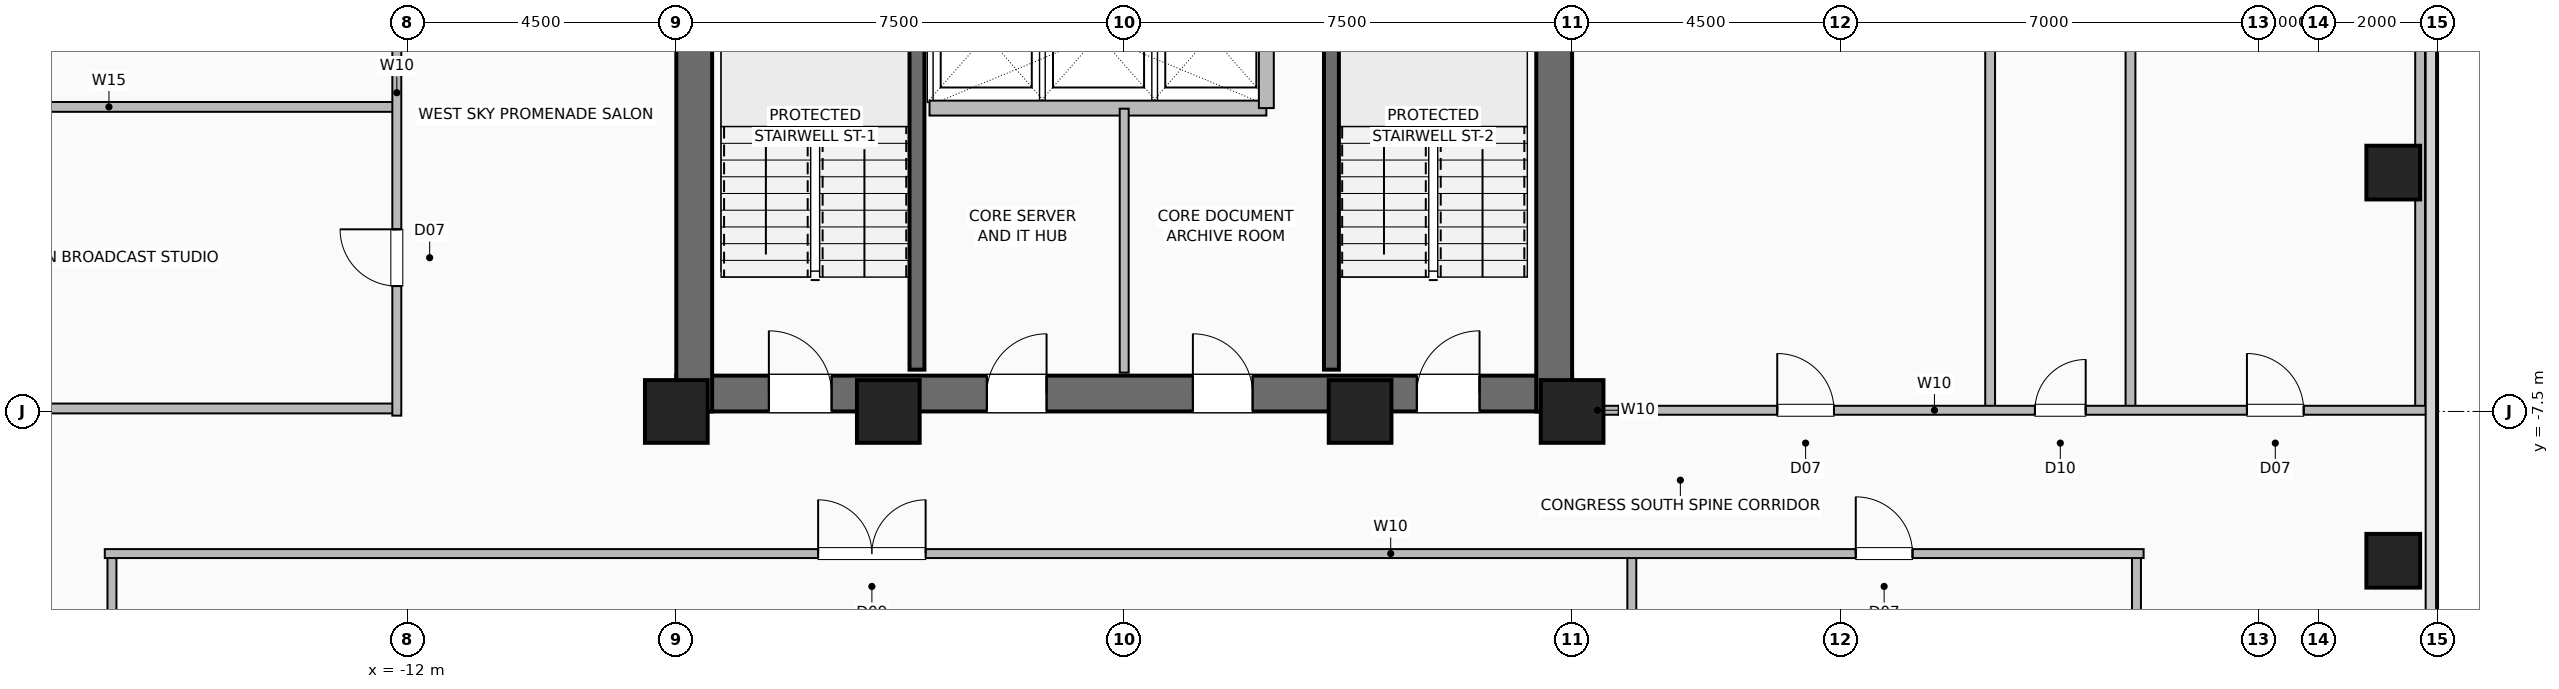
"""IFC4 building model, lengths in metres.
Left out: names, types, materials, properties, quantities, classifications, styles, units other than length and angle.
Written with IfcOpenShell. Run it as: python <this file> out.ifc"""

import sys

from ifc_helpers import new_model, si_unit, direction, frame, frame_2d, origin, origin_2d, place, context, subcontext, project, spatial, rectangle, hollow_rectangle, extrude, element, fill, save


model = new_model("IFC4")
c1 = context("Model", 3, precision=1e-05, world=origin(), true_north=direction((0.0, 1.0)))
c2 = subcontext(c1, "Body", "Model", "MODEL_VIEW")
j1 = project(units=[si_unit("LENGTHUNIT", "METRE"), si_unit("PLANEANGLEUNIT", "RADIAN")], contexts=[c1])
p1 = place(None, origin())
s1 = spatial("IfcSite", under=j1, at=p1, CompositionType="ELEMENT")
p2 = place(p1, origin())
s2 = spatial("IfcBuilding", under=s1, at=p2, CompositionType="ELEMENT")
p3 = place(p2, frame((0.0, 0.0, 140.8)))
s3 = spatial("IfcBuildingStorey", under=s2, at=p3, CompositionType="ELEMENT", Elevation=140.8)
for number, where, z_axis, x_axis in (
    (1, (-7.5, -7.5, 0.0), (0.0, 0.0, 1.0), (1.0, 0.0, 0.0)),
    (2, (-3.95, -7.5, 0.0), (0.0, 0.0, 1.0), (1.0, 0.0, 0.0)),
    (3, (3.95, -7.5, 0.0), (0.0, 0.0, 1.0), (1.0, 0.0, 0.0)),
    (4, (7.5, -7.5, 0.0), (0.0, 0.0, 1.0), (1.0, 0.0, 0.0)),
):
    element("IfcColumn", number, at=place(p3, frame(where, z_axis=z_axis, x_axis=x_axis)), inside=s3, PredefinedType="COLUMN", context=c2, shape_type="SweptSolid", body=[
        extrude(hollow_rectangle(XDim=1.05, YDim=1.05, WallThickness=0.05, at=origin_2d()), origin(), (0.0, 0.0, 1.0), 3.6),
    ])
for number, where, z_axis, x_axis in (
    (5, (21.25, -10.0, 0.0), (0.0, 0.0, 1.0), (1.0, 0.0, 0.0)),
    (6, (21.25, -3.5, 0.0), (0.0, 0.0, 1.0), (1.0, 0.0, 0.0)),
):
    element("IfcColumn", number, at=place(p3, frame(where, z_axis=z_axis, x_axis=x_axis)), inside=s3, PredefinedType="COLUMN", context=c2, shape_type="SweptSolid", body=[
        extrude(hollow_rectangle(XDim=0.9, YDim=0.9, WallThickness=0.045, at=origin_2d()), origin(), (0.0, 0.0, 1.0), 3.6),
    ])
p4 = place(p3, frame((-7.5, -7.2, 0.0), z_axis=(0.0, 0.0, 1.0), x_axis=(1.0, 0.0, 0.0)))
e7 = element("IfcWall", 7, at=p4, inside=s3, PredefinedType="SHEAR", context=c2, shape_type="SweptSolid", body=[
    extrude(rectangle(XDim=15.0, YDim=0.6, at=frame_2d((7.5, 0.0))), origin(), (0.0, 0.0, 1.0), 3.36),
])
p5 = place(p4, frame((1.55, 0.0, 0.0)))
e8 = element("IfcOpeningElement", 8, at=p5, cuts=e7, PredefinedType="OPENING", context=c2, shape_type="SweptSolid", body=[
    extrude(rectangle(XDim=1.05, YDim=2.08, at=frame_2d((0.525, 1.04))), frame((0.0, 0.31, 0.0), z_axis=(0.0, -1.0, 0.0), x_axis=(1.0, 0.0, 0.0)), (0.0, 0.0, 1.0), 0.62),
])
p6 = place(p4, frame((12.4, 0.0, 0.0)))
e9 = element("IfcOpeningElement", 9, at=p6, cuts=e7, PredefinedType="OPENING", context=c2, shape_type="SweptSolid", body=[
    extrude(rectangle(XDim=1.05, YDim=2.08, at=frame_2d((0.525, 1.04))), frame((0.0, 0.31, 0.0), z_axis=(0.0, -1.0, 0.0), x_axis=(1.0, 0.0, 0.0)), (0.0, 0.0, 1.0), 0.62),
])
p7 = place(p4, frame((5.2, 0.0, 0.0)))
e10 = element("IfcOpeningElement", 10, at=p7, cuts=e7, PredefinedType="OPENING", context=c2, shape_type="SweptSolid", body=[
    extrude(rectangle(XDim=1.0, YDim=2.08, at=frame_2d((0.5, 1.04))), frame((0.0, 0.31, 0.0), z_axis=(0.0, -1.0, 0.0), x_axis=(1.0, 0.0, 0.0)), (0.0, 0.0, 1.0), 0.62),
])
p8 = place(p4, frame((8.65, 0.0, 0.0)))
e11 = element("IfcOpeningElement", 11, at=p8, cuts=e7, PredefinedType="OPENING", context=c2, shape_type="SweptSolid", body=[
    extrude(rectangle(XDim=1.0, YDim=2.08, at=frame_2d((0.5, 1.04))), frame((0.0, 0.31, 0.0), z_axis=(0.0, -1.0, 0.0), x_axis=(1.0, 0.0, 0.0)), (0.0, 0.0, 1.0), 0.62),
])
p9 = place(p3, frame((-7.2, -7.5, 0.0), z_axis=(0.0, 0.0, 1.0), x_axis=(0.0, 1.0, 0.0)))
e12 = element("IfcWall", 12, at=p9, inside=s3, PredefinedType="SHEAR", context=c2, shape_type="SweptSolid", body=[
    extrude(rectangle(XDim=15.0, YDim=0.6, at=frame_2d((7.5, 0.0))), origin(), (0.0, 0.0, 1.0), 3.36),
])
p10 = place(p9, frame((9.5, 0.0, 0.0)))
e13 = element("IfcOpeningElement", 13, at=p10, cuts=e12, PredefinedType="OPENING", context=c2, shape_type="SweptSolid", body=[
    extrude(rectangle(XDim=1.0, YDim=2.08, at=frame_2d((0.5, 1.04))), frame((0.0, 0.31, 0.0), z_axis=(0.0, -1.0, 0.0), x_axis=(1.0, 0.0, 0.0)), (0.0, 0.0, 1.0), 0.62),
])
p11 = place(p3, frame((7.2, -7.5, 0.0), z_axis=(0.0, 0.0, 1.0), x_axis=(0.0, 1.0, 0.0)))
e14 = element("IfcWall", 14, at=p11, inside=s3, PredefinedType="SHEAR", context=c2, shape_type="SweptSolid", body=[
    extrude(rectangle(XDim=15.0, YDim=0.6, at=frame_2d((7.5, 0.0))), origin(), (0.0, 0.0, 1.0), 3.36),
])
for number, where, z_axis, x_axis in (
    (15, (-3.47, -6.8, 0.0), (0.0, 0.0, 1.0), (0.0, 1.0, 0.0)),
    (16, (3.47, -6.8, 0.0), (0.0, 0.0, 1.0), (0.0, 1.0, 0.0)),
):
    element("IfcWall", number, at=place(p3, frame(where, z_axis=z_axis, x_axis=x_axis)), inside=s3, PredefinedType="SHEAR", context=c2, shape_type="SweptSolid", body=[
        extrude(rectangle(XDim=7.72, YDim=0.25, at=frame_2d((3.86, 0.0))), origin(), (0.0, 0.0, 1.0), 3.36),
    ])
p12 = place(p3, frame((-3.26, -2.42, 0.0), z_axis=(0.0, 0.0, 1.0), x_axis=(1.0, 0.0, 0.0)))
e17 = element("IfcWall", 17, at=p12, inside=s3, PredefinedType="SHEAR", context=c2, shape_type="SweptSolid", body=[
    extrude(rectangle(XDim=5.64, YDim=0.25, at=frame_2d((2.82, 0.0))), origin(), (0.0, 0.0, 1.0), 3.36),
])
p13 = place(p3, frame((2.38, -2.42, 0.0), z_axis=(0.0, 0.0, 1.0), x_axis=(0.0, 1.0, 0.0)))
e18 = element("IfcWall", 18, at=p13, inside=s3, PredefinedType="SHEAR", context=c2, shape_type="SweptSolid", body=[
    extrude(rectangle(XDim=2.44, YDim=0.25, at=frame_2d((1.22, 0.0))), origin(), (0.0, 0.0, 1.0), 3.36),
])
p14 = place(p3, frame((0.0, -6.85, 0.0), z_axis=(0.0, 0.0, 1.0), x_axis=(0.0, 1.0, 0.0)))
e19 = element("IfcWall", 19, at=p14, inside=s3, PredefinedType="PARTITIONING", context=c2, shape_type="SweptSolid", body=[
    extrude(rectangle(XDim=4.42, YDim=0.15, at=frame_2d((2.21, 0.0))), origin(), (0.0, 0.0, 1.0), 3.36),
])
for number, where, z_axis, x_axis in (
    (20, (-16.95, -21.82, 0.0), (0.0, 0.0, 1.0), (0.0, 1.0, 0.0)),
    (21, (8.5, -21.82, 0.0), (0.0, 0.0, 1.0), (0.0, 1.0, 0.0)),
    (22, (16.95, -21.82, 0.0), (0.0, 0.0, 1.0), (0.0, 1.0, 0.0)),
):
    element("IfcWall", number, at=place(p3, frame(where, z_axis=z_axis, x_axis=x_axis)), inside=s3, PredefinedType="PARTITIONING", context=c2, shape_type="SweptSolid", body=[
        extrude(rectangle(XDim=11.94, YDim=0.15, at=frame_2d((5.97, 0.0))), origin(), (0.0, 0.0, 1.0), 3.36),
    ])
p15 = place(p3, frame((-17.07, -9.88, 0.0), z_axis=(0.0, 0.0, 1.0), x_axis=(1.0, 0.0, 0.0)))
e23 = element("IfcWall", 23, at=p15, inside=s3, PredefinedType="PARTITIONING", context=c2, shape_type="SweptSolid", body=[
    extrude(rectangle(XDim=34.14, YDim=0.15, at=frame_2d((17.07, 0.0))), origin(), (0.0, 0.0, 1.0), 3.36),
])
p16 = place(p15, frame((11.945, 0.0, 0.0)))
e24 = element("IfcOpeningElement", 24, at=p16, cuts=e23, PredefinedType="OPENING", context=c2, shape_type="SweptSolid", body=[
    extrude(rectangle(XDim=1.8, YDim=2.08, at=frame_2d((0.9, 1.04))), frame((0.0, 0.085, 0.0), z_axis=(0.0, -1.0, 0.0), x_axis=(1.0, 0.0, 0.0)), (0.0, 0.0, 1.0), 0.17),
])
p17 = place(p15, frame((29.32, 0.0, 0.0)))
e25 = element("IfcOpeningElement", 25, at=p17, cuts=e23, PredefinedType="OPENING", context=c2, shape_type="SweptSolid", body=[
    extrude(rectangle(XDim=0.95, YDim=2.06, at=frame_2d((0.475, 1.03))), frame((0.0, 0.085, 0.0), z_axis=(0.0, -1.0, 0.0), x_axis=(1.0, 0.0, 0.0)), (0.0, 0.0, 1.0), 0.17),
])
for number, where, z_axis, x_axis in (
    (26, (-21.82, -7.45, 0.0), (0.0, 0.0, 1.0), (1.0, 0.0, 0.0)),
    (27, (-21.82, -2.4, 0.0), (0.0, 0.0, 1.0), (1.0, 0.0, 0.0)),
):
    element("IfcWall", number, at=place(p3, frame(where, z_axis=z_axis, x_axis=x_axis)), inside=s3, PredefinedType="PLUMBINGWALL", context=c2, shape_type="SweptSolid", body=[
        extrude(rectangle(XDim=9.64, YDim=0.165, at=frame_2d((4.82, 0.0))), origin(), (0.0, 0.0, 1.0), 3.36),
    ])
p18 = place(p3, frame((-12.18, -7.57, 0.0), z_axis=(0.0, 0.0, 1.0), x_axis=(0.0, 1.0, 0.0)))
e28 = element("IfcWall", 28, at=p18, inside=s3, PredefinedType="PARTITIONING", context=c2, shape_type="SweptSolid", body=[
    extrude(rectangle(XDim=15.14, YDim=0.15, at=frame_2d((7.57, 0.0))), origin(), (0.0, 0.0, 1.0), 3.36),
])
p19 = place(p18, frame((2.17, 0.0, 0.0)))
e29 = element("IfcOpeningElement", 29, at=p19, cuts=e28, PredefinedType="OPENING", context=c2, shape_type="SweptSolid", body=[
    extrude(rectangle(XDim=0.95, YDim=2.06, at=frame_2d((0.475, 1.03))), frame((0.0, 0.085, 0.0), z_axis=(0.0, -1.0, 0.0), x_axis=(1.0, 0.0, 0.0)), (0.0, 0.0, 1.0), 0.17),
])
p20 = place(p18, frame((7.695, 0.0, 0.0)))
e30 = element("IfcOpeningElement", 30, at=p20, cuts=e28, PredefinedType="OPENING", context=c2, shape_type="SweptSolid", body=[
    extrude(rectangle(XDim=0.95, YDim=2.06, at=frame_2d((0.475, 1.03))), frame((0.0, 0.085, 0.0), z_axis=(0.0, -1.0, 0.0), x_axis=(1.0, 0.0, 0.0)), (0.0, 0.0, 1.0), 0.17),
])
p21 = place(p18, frame((11.615, 0.0, 0.0)))
e31 = element("IfcOpeningElement", 31, at=p21, cuts=e28, PredefinedType="OPENING", context=c2, shape_type="SweptSolid", body=[
    extrude(rectangle(XDim=0.85, YDim=2.05, at=frame_2d((0.425, 1.025))), frame((0.0, 0.085, 0.0), z_axis=(0.0, -1.0, 0.0), x_axis=(1.0, 0.0, 0.0)), (0.0, 0.0, 1.0), 0.17),
])
p22 = place(p18, frame((13.49, 0.0, 0.0)))
e32 = element("IfcOpeningElement", 32, at=p22, cuts=e28, PredefinedType="OPENING", context=c2, shape_type="SweptSolid", body=[
    extrude(rectangle(XDim=0.95, YDim=2.06, at=frame_2d((0.475, 1.03))), frame((0.0, 0.085, 0.0), z_axis=(0.0, -1.0, 0.0), x_axis=(1.0, 0.0, 0.0)), (0.0, 0.0, 1.0), 0.17),
])
p23 = place(p3, frame((7.45, -7.48, 0.0), z_axis=(0.0, 0.0, 1.0), x_axis=(1.0, 0.0, 0.0)))
e33 = element("IfcWall", 33, at=p23, inside=s3, PredefinedType="PARTITIONING", context=c2, shape_type="SweptSolid", body=[
    extrude(rectangle(XDim=0.95, YDim=0.15, at=frame_2d((0.475, 0.0))), origin(), (0.0, 0.0, 1.0), 3.36),
])
for number, where, z_axis, x_axis in (
    (34, (16.85, -7.48, 0.0), (0.0, 0.0, 1.0), (0.0, 1.0, 0.0)),
    (35, (14.5, -7.48, 0.0), (0.0, 0.0, 1.0), (0.0, 1.0, 0.0)),
    (36, (21.7, -7.48, 0.0), (0.0, 0.0, 1.0), (0.0, 1.0, 0.0)),
):
    element("IfcWall", number, at=place(p3, frame(where, z_axis=z_axis, x_axis=x_axis)), inside=s3, PredefinedType="PLUMBINGWALL", context=c2, shape_type="SweptSolid", body=[
        extrude(rectangle(XDim=14.88, YDim=0.165, at=frame_2d((7.44, 0.0))), origin(), (0.0, 0.0, 1.0), 3.36),
    ])
p24 = place(p3, frame((8.28, -7.48, 0.0), z_axis=(0.0, 0.0, 1.0), x_axis=(1.0, 0.0, 0.0)))
e37 = element("IfcWall", 37, at=p24, inside=s3, PredefinedType="PARTITIONING", context=c2, shape_type="SweptSolid", body=[
    extrude(rectangle(XDim=13.54, YDim=0.15, at=frame_2d((6.77, 0.0))), origin(), (0.0, 0.0, 1.0), 3.36),
])
p25 = place(p24, frame((2.655, 0.0, 0.0)))
e38 = element("IfcOpeningElement", 38, at=p25, cuts=e37, PredefinedType="OPENING", context=c2, shape_type="SweptSolid", body=[
    extrude(rectangle(XDim=0.95, YDim=2.06, at=frame_2d((0.475, 1.03))), frame((0.0, 0.085, 0.0), z_axis=(0.0, -1.0, 0.0), x_axis=(1.0, 0.0, 0.0)), (0.0, 0.0, 1.0), 0.17),
])
p26 = place(p24, frame((6.97, 0.0, 0.0)))
e39 = element("IfcOpeningElement", 39, at=p26, cuts=e37, PredefinedType="OPENING", context=c2, shape_type="SweptSolid", body=[
    extrude(rectangle(XDim=0.85, YDim=2.05, at=frame_2d((0.425, 1.025))), frame((0.0, 0.085, 0.0), z_axis=(0.0, -1.0, 0.0), x_axis=(1.0, 0.0, 0.0)), (0.0, 0.0, 1.0), 0.17),
])
p27 = place(p24, frame((10.52, 0.0, 0.0)))
e40 = element("IfcOpeningElement", 40, at=p27, cuts=e37, PredefinedType="OPENING", context=c2, shape_type="SweptSolid", body=[
    extrude(rectangle(XDim=0.95, YDim=2.06, at=frame_2d((0.475, 1.03))), frame((0.0, 0.085, 0.0), z_axis=(0.0, -1.0, 0.0), x_axis=(1.0, 0.0, 0.0)), (0.0, 0.0, 1.0), 0.17),
])
p28 = place(p5, origin())
e41 = element("IfcDoor", 41, at=p28, inside=s3, OperationType="SINGLE_SWING_LEFT", PredefinedType="DOOR", context=c2, shape_type="SweptSolid", body=[
    extrude(rectangle(XDim=1.05, YDim=2.08, at=frame_2d((0.525, 1.04))), frame((0.0, 0.025, 0.0), z_axis=(0.0, -1.0, 0.0), x_axis=(1.0, 0.0, 0.0)), (0.0, 0.0, 1.0), 0.05),
])
fill(e8, e41)
p29 = place(p6, origin())
e42 = element("IfcDoor", 42, at=p29, inside=s3, OperationType="SINGLE_SWING_RIGHT", PredefinedType="DOOR", context=c2, shape_type="SweptSolid", body=[
    extrude(rectangle(XDim=1.05, YDim=2.08, at=frame_2d((0.525, 1.04))), frame((0.0, 0.025, 0.0), z_axis=(0.0, -1.0, 0.0), x_axis=(1.0, 0.0, 0.0)), (0.0, 0.0, 1.0), 0.05),
])
fill(e9, e42)
p30 = place(p7, origin())
e43 = element("IfcDoor", 43, at=p30, inside=s3, OperationType="SINGLE_SWING_RIGHT", PredefinedType="DOOR", context=c2, shape_type="SweptSolid", body=[
    extrude(rectangle(XDim=1.0, YDim=2.08, at=frame_2d((0.5, 1.04))), frame((0.0, 0.025, 0.0), z_axis=(0.0, -1.0, 0.0), x_axis=(1.0, 0.0, 0.0)), (0.0, 0.0, 1.0), 0.05),
])
fill(e10, e43)
p31 = place(p8, origin())
e44 = element("IfcDoor", 44, at=p31, inside=s3, OperationType="SINGLE_SWING_LEFT", PredefinedType="DOOR", context=c2, shape_type="SweptSolid", body=[
    extrude(rectangle(XDim=1.0, YDim=2.08, at=frame_2d((0.5, 1.04))), frame((0.0, 0.025, 0.0), z_axis=(0.0, -1.0, 0.0), x_axis=(1.0, 0.0, 0.0)), (0.0, 0.0, 1.0), 0.05),
])
fill(e11, e44)
p32 = place(p16, origin())
e45 = element("IfcDoor", 45, at=p32, inside=s3, OperationType="DOUBLE_DOOR_SINGLE_SWING", PredefinedType="DOOR", context=c2, shape_type="SweptSolid", body=[
    extrude(rectangle(XDim=1.8, YDim=2.08, at=frame_2d((0.9, 1.04))), frame((0.0, 0.025, 0.0), z_axis=(0.0, -1.0, 0.0), x_axis=(1.0, 0.0, 0.0)), (0.0, 0.0, 1.0), 0.05),
])
fill(e24, e45)
p33 = place(p17, origin())
e46 = element("IfcDoor", 46, at=p33, inside=s3, OperationType="SINGLE_SWING_LEFT", PredefinedType="DOOR", context=c2, shape_type="SweptSolid", body=[
    extrude(rectangle(XDim=0.95, YDim=2.06, at=frame_2d((0.475, 1.03))), frame((0.0, 0.025, 0.0), z_axis=(0.0, -1.0, 0.0), x_axis=(1.0, 0.0, 0.0)), (0.0, 0.0, 1.0), 0.05),
])
fill(e25, e46)
p34 = place(p19, origin())
e47 = element("IfcDoor", 47, at=p34, inside=s3, OperationType="SINGLE_SWING_RIGHT", PredefinedType="DOOR", context=c2, shape_type="SweptSolid", body=[
    extrude(rectangle(XDim=0.95, YDim=2.06, at=frame_2d((0.475, 1.03))), frame((0.0, 0.025, 0.0), z_axis=(0.0, -1.0, 0.0), x_axis=(1.0, 0.0, 0.0)), (0.0, 0.0, 1.0), 0.05),
])
fill(e29, e47)
p35 = place(p25, origin())
e48 = element("IfcDoor", 48, at=p35, inside=s3, OperationType="SINGLE_SWING_LEFT", PredefinedType="DOOR", context=c2, shape_type="SweptSolid", body=[
    extrude(rectangle(XDim=0.95, YDim=2.06, at=frame_2d((0.475, 1.03))), frame((0.0, 0.025, 0.0), z_axis=(0.0, -1.0, 0.0), x_axis=(1.0, 0.0, 0.0)), (0.0, 0.0, 1.0), 0.05),
])
fill(e38, e48)
p36 = place(p26, origin())
e49 = element("IfcDoor", 49, at=p36, inside=s3, OperationType="SINGLE_SWING_RIGHT", PredefinedType="DOOR", context=c2, shape_type="SweptSolid", body=[
    extrude(rectangle(XDim=0.85, YDim=2.05, at=frame_2d((0.425, 1.025))), frame((0.0, 0.025, 0.0), z_axis=(0.0, -1.0, 0.0), x_axis=(1.0, 0.0, 0.0)), (0.0, 0.0, 1.0), 0.05),
])
fill(e39, e49)
p37 = place(p27, origin())
e50 = element("IfcDoor", 50, at=p37, inside=s3, OperationType="SINGLE_SWING_LEFT", PredefinedType="DOOR", context=c2, shape_type="SweptSolid", body=[
    extrude(rectangle(XDim=0.95, YDim=2.06, at=frame_2d((0.475, 1.03))), frame((0.0, 0.025, 0.0), z_axis=(0.0, -1.0, 0.0), x_axis=(1.0, 0.0, 0.0)), (0.0, 0.0, 1.0), 0.05),
])
fill(e40, e50)
save(model, sys.argv[1])
